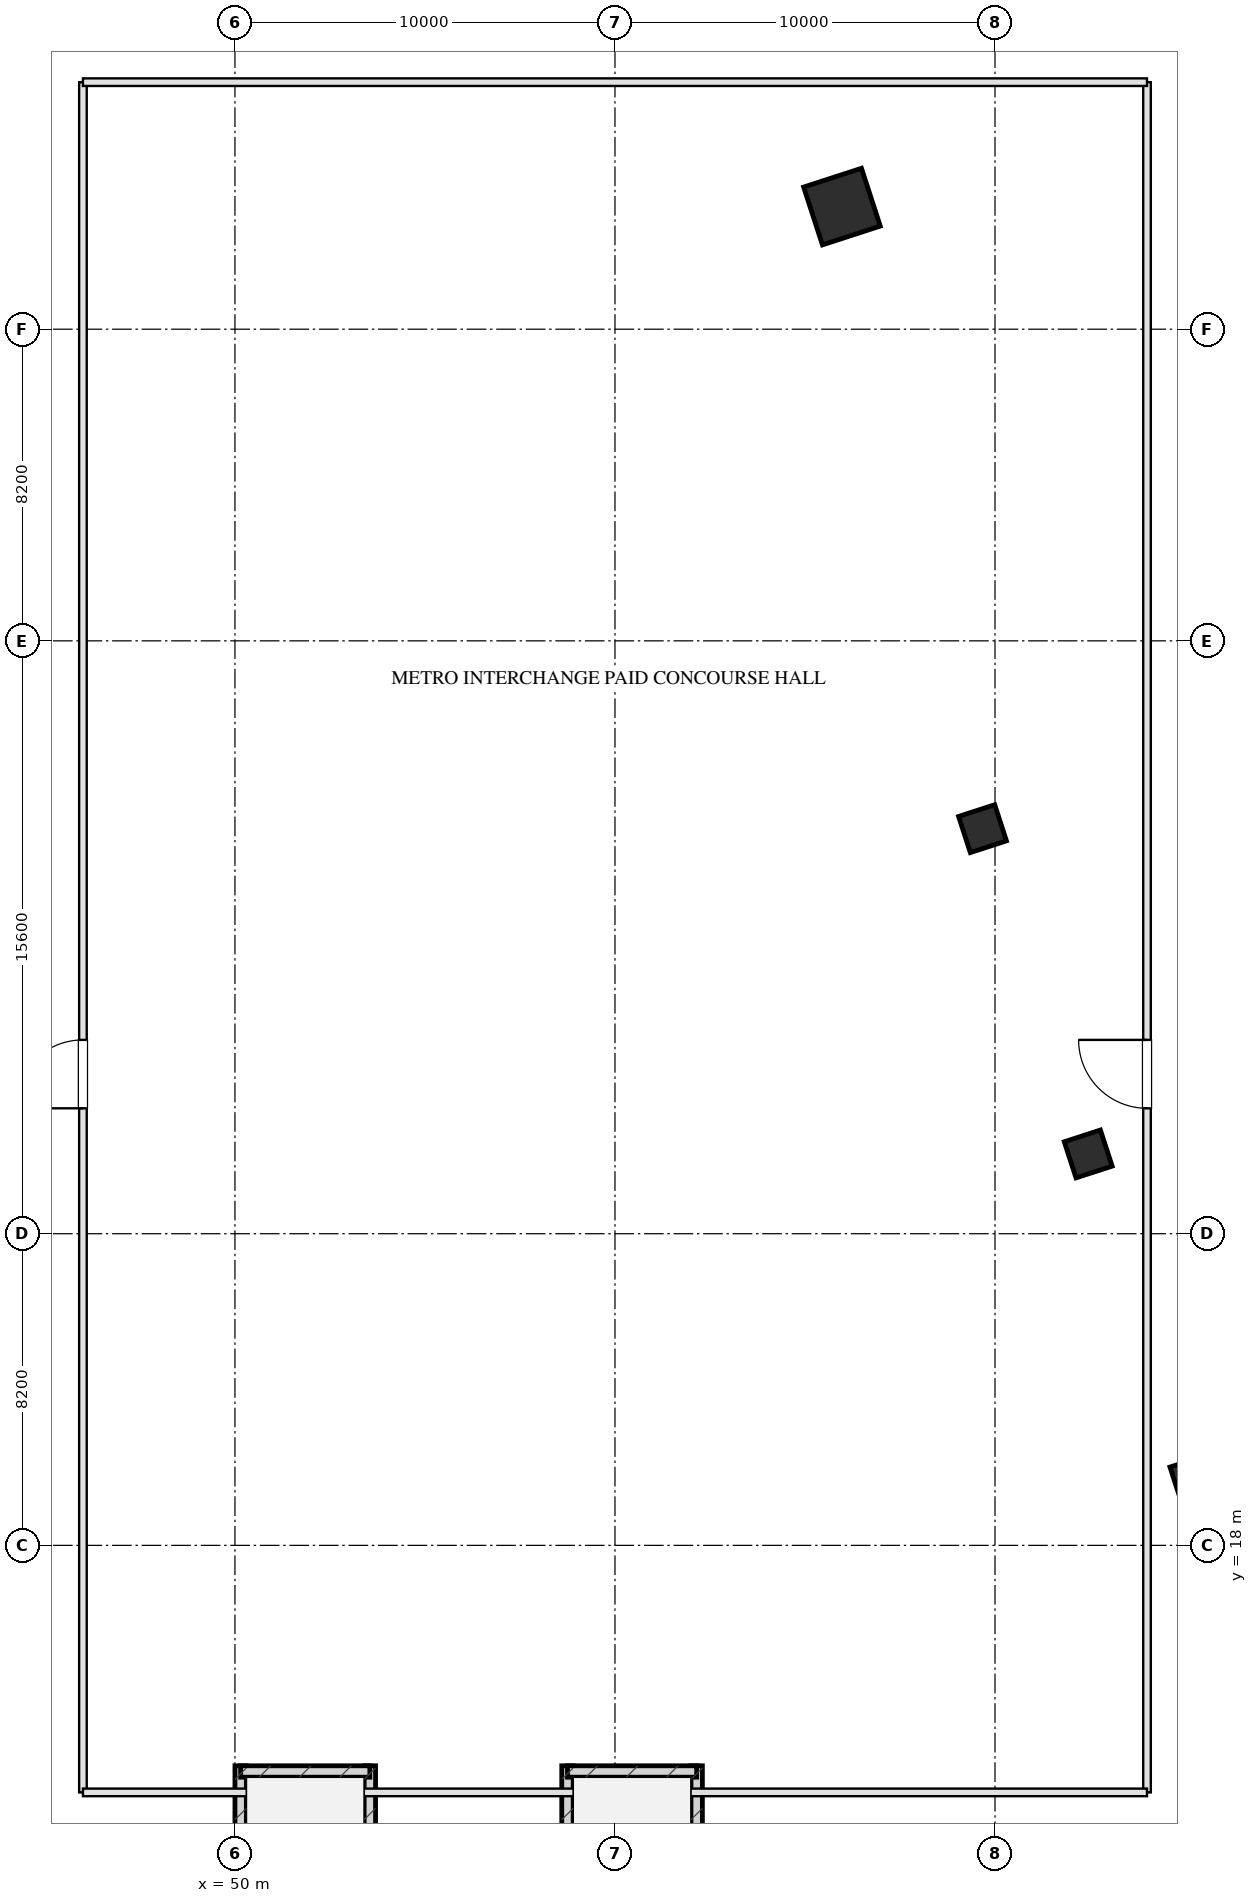
"""IFC4 building model, lengths in metres.
Left out: names, types, materials, properties, quantities, classifications, styles, units other than length and angle.
Written with IfcOpenShell. Run it as: python <this file> out.ifc"""

import sys

from ifc_helpers import new_model, si_unit, direction, frame, frame_2d, origin, origin_2d, place, context, subcontext, project, spatial, rectangle, hollow_rectangle, extrude, element, fill, save


model = new_model("IFC4")
c1 = context("Model", 3, precision=1e-05, world=origin(), true_north=direction((0.0, 1.0)))
c2 = subcontext(c1, "Body", "Model", "MODEL_VIEW")
j1 = project(units=[si_unit("LENGTHUNIT", "METRE"), si_unit("PLANEANGLEUNIT", "RADIAN")], contexts=[c1])
p1 = place(None, origin())
s1 = spatial("IfcSite", under=j1, at=p1, CompositionType="ELEMENT")
p2 = place(p1, origin())
s2 = spatial("IfcBuilding", under=s1, at=p2, CompositionType="ELEMENT")
p3 = place(p2, frame((0.0, 0.0, -6.0)))
s3 = spatial("IfcBuildingStorey", under=s2, at=p3, CompositionType="ELEMENT", Elevation=-6.0)
for number, where, z_axis, x_axis in (
    (1, (50.15, 3.3, 0.0), (0.0, 0.0, 1.0), (0.0, 1.0, 0.0)),
    (2, (53.55, 3.3, 0.0), (0.0, 0.0, 1.0), (0.0, 1.0, 0.0)),
):
    element("IfcWall", number, at=place(p3, frame(where, z_axis=z_axis, x_axis=x_axis)), inside=s3, PredefinedType="SHEAR", context=c2, shape_type="SweptSolid", body=[
        extrude(rectangle(XDim=8.9, YDim=0.3, at=frame_2d((4.45, 0.0))), origin(), (0.0, 0.0, 1.0), 6.0),
    ])
p4 = place(p3, frame((50.15, 12.05, 0.0), z_axis=(0.0, 0.0, 1.0), x_axis=(1.0, 0.0, 0.0)))
e3 = element("IfcWall", 3, at=p4, inside=s3, PredefinedType="SHEAR", context=c2, shape_type="SweptSolid", body=[
    extrude(rectangle(XDim=3.4, YDim=0.3, at=frame_2d((1.7, 0.0))), origin(), (0.0, 0.0, 1.0), 6.0),
])
for number, where, z_axis, x_axis in (
    (4, (58.75, 3.3, 0.0), (0.0, 0.0, 1.0), (0.0, 1.0, 0.0)),
    (5, (62.15, 3.3, 0.0), (0.0, 0.0, 1.0), (0.0, 1.0, 0.0)),
):
    element("IfcWall", number, at=place(p3, frame(where, z_axis=z_axis, x_axis=x_axis)), inside=s3, PredefinedType="SHEAR", context=c2, shape_type="SweptSolid", body=[
        extrude(rectangle(XDim=8.9, YDim=0.3, at=frame_2d((4.45, 0.0))), origin(), (0.0, 0.0, 1.0), 6.0),
    ])
p5 = place(p3, frame((58.75, 12.05, 0.0), z_axis=(0.0, 0.0, 1.0), x_axis=(1.0, 0.0, 0.0)))
e6 = element("IfcWall", 6, at=p5, inside=s3, PredefinedType="SHEAR", context=c2, shape_type="SweptSolid", body=[
    extrude(rectangle(XDim=3.4, YDim=0.3, at=frame_2d((1.7, 0.0))), origin(), (0.0, 0.0, 1.0), 6.0),
])
p6 = place(p3, frame((65.973, 53.226, 0.0), z_axis=(0.0, 0.0, 1.0), x_axis=(0.951056516295, 0.309016994375, 0.0)))
e7 = element("IfcColumn", 7, at=p6, inside=s3, PredefinedType="COLUMN", context=c2, shape_type="SweptSolid", body=[
    extrude(hollow_rectangle(XDim=1.6, YDim=1.6, WallThickness=0.055, at=origin_2d()), origin(), (0.0, 0.0, 1.0), 6.001),
])
for number, where, z_axis, x_axis in (
    (8, (75.234, 19.739, 0.0), (0.0, 0.0, 1.0), (0.951, 0.309, 0.0)),
    (9, (72.453, 28.299, 0.0), (0.0, 0.0, 1.0), (0.951, 0.309, 0.0)),
    (10, (69.672, 36.858, 0.0), (0.0, 0.0, 1.0), (0.951, 0.309, 0.0)),
):
    element("IfcColumn", number, at=place(p3, frame(where, z_axis=z_axis, x_axis=x_axis)), inside=s3, PredefinedType="COLUMN", context=c2, shape_type="SweptSolid", body=[
        extrude(hollow_rectangle(XDim=1.0, YDim=1.0, WallThickness=0.036, at=origin_2d()), origin(), (0.0, 0.0, 1.0), 6.001),
    ])
p7 = place(p3, frame((46.0, 11.5, 0.0), z_axis=(0.0, 0.0, 1.0), x_axis=(0.0, 1.0, 0.0)))
e11 = element("IfcWall", 11, at=p7, inside=s3, PredefinedType="PARTITIONING", context=c2, shape_type="SweptSolid", body=[
    extrude(rectangle(XDim=45.0, YDim=0.2, at=frame_2d((22.5, 0.0))), origin(), (0.0, 0.0, 1.0), 5.685),
])
p8 = place(p7, frame((18.0, 0.0, 0.0)))
e12 = element("IfcOpeningElement", 12, at=p8, cuts=e11, PredefinedType="OPENING", context=c2, shape_type="SweptSolid", body=[
    extrude(rectangle(XDim=1.8, YDim=2.05, at=frame_2d((0.9, 1.025))), frame((0.0, 0.11, 0.0), z_axis=(0.0, -1.0, 0.0), x_axis=(1.0, 0.0, 0.0)), (0.0, 0.0, 1.0), 0.22),
])
p9 = place(p3, frame((74.0, 11.5, 0.0), z_axis=(0.0, 0.0, 1.0), x_axis=(0.0, 1.0, 0.0)))
e13 = element("IfcWall", 13, at=p9, inside=s3, PredefinedType="PARTITIONING", context=c2, shape_type="SweptSolid", body=[
    extrude(rectangle(XDim=45.0, YDim=0.2, at=frame_2d((22.5, 0.0))), origin(), (0.0, 0.0, 1.0), 5.685),
])
p10 = place(p9, frame((18.0, 0.0, 0.0)))
e14 = element("IfcOpeningElement", 14, at=p10, cuts=e13, PredefinedType="OPENING", context=c2, shape_type="SweptSolid", body=[
    extrude(rectangle(XDim=1.8, YDim=2.05, at=frame_2d((0.9, 1.025))), frame((0.0, 0.11, 0.0), z_axis=(0.0, -1.0, 0.0), x_axis=(1.0, 0.0, 0.0)), (0.0, 0.0, 1.0), 0.22),
])
for number, where, z_axis, x_axis in (
    (15, (46.0, 56.5, 0.0), (0.0, 0.0, 1.0), (1.0, 0.0, 0.0)),
    (16, (46.0, 11.5, 0.0), (0.0, 0.0, 1.0), (1.0, 0.0, 0.0)),
):
    element("IfcWall", number, at=place(p3, frame(where, z_axis=z_axis, x_axis=x_axis)), inside=s3, PredefinedType="PARTITIONING", context=c2, shape_type="SweptSolid", body=[
        extrude(rectangle(XDim=28.0, YDim=0.2, at=frame_2d((14.0, 0.0))), origin(), (0.0, 0.0, 1.0), 5.685),
    ])
p11 = place(p8, origin())
e17 = element("IfcDoor", 17, at=p11, inside=s3, OperationType="SINGLE_SWING_LEFT", PredefinedType="DOOR", context=c2, shape_type="SweptSolid", body=[
    extrude(rectangle(XDim=1.8, YDim=2.05, at=frame_2d((0.9, 1.025))), frame((0.0, 0.025, 0.0), z_axis=(0.0, -1.0, 0.0), x_axis=(1.0, 0.0, 0.0)), (0.0, 0.0, 1.0), 0.05),
])
fill(e12, e17)
p12 = place(p10, origin())
e18 = element("IfcDoor", 18, at=p12, inside=s3, OperationType="SINGLE_SWING_RIGHT", PredefinedType="DOOR", context=c2, shape_type="SweptSolid", body=[
    extrude(rectangle(XDim=1.8, YDim=2.05, at=frame_2d((0.9, 1.025))), frame((0.0, 0.025, 0.0), z_axis=(0.0, -1.0, 0.0), x_axis=(1.0, 0.0, 0.0)), (0.0, 0.0, 1.0), 0.05),
])
fill(e14, e18)
save(model, sys.argv[1])
